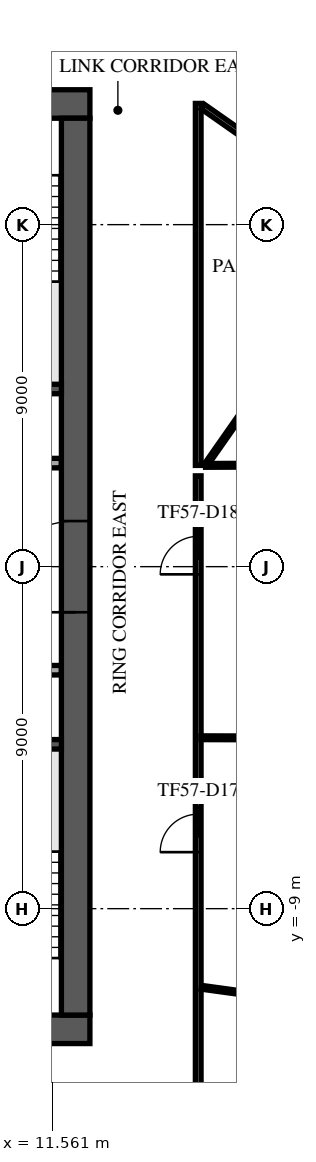
"""IFC4 building model, lengths in metres.
Left out: names, types, materials, properties, quantities, classifications, styles, units other than length and angle.
Written with IfcOpenShell. Run it as: python <this file> out.ifc"""

import sys

from ifc_helpers import new_model, si_unit, direction, frame, frame_2d, origin, place, context, subcontext, project, spatial, rectangle, extrude, element, fill, save


model = new_model("IFC4")
c1 = context("Model", 3, precision=1e-05, world=origin(), true_north=direction((0.0, 1.0)))
c2 = subcontext(c1, "Body", "Model", "MODEL_VIEW")
j1 = project(units=[si_unit("LENGTHUNIT", "METRE"), si_unit("PLANEANGLEUNIT", "RADIAN")], contexts=[c1])
p1 = place(None, origin())
s1 = spatial("IfcSite", under=j1, at=p1, CompositionType="ELEMENT")
p2 = place(p1, origin())
s2 = spatial("IfcBuilding", under=s1, at=p2, CompositionType="ELEMENT")
p3 = place(p2, frame((0.0, 0.0, 242.9)))
s3 = spatial("IfcBuildingStorey", under=s2, at=p3, CompositionType="ELEMENT", Elevation=242.9)
p4 = place(p3, frame((-12.55, 12.175, 0.0), z_axis=(0.0, 0.0, 1.0), x_axis=(1.0, 0.0, 0.0)))
e1 = element("IfcWall", 1, at=p4, inside=s3, PredefinedType="SHEAR", context=c2, shape_type="SweptSolid", body=[
    extrude(rectangle(XDim=25.1, YDim=0.75, at=frame_2d((12.55, 0.0))), origin(), (0.0, 0.0, 1.0), 3.64),
])
p5 = place(p4, frame((11.35, 0.0, 0.0)))
e2 = element("IfcOpeningElement", 2, at=p5, cuts=e1, PredefinedType="OPENING", context=c2, shape_type="SweptSolid", body=[
    extrude(rectangle(XDim=2.4, YDim=2.4, at=frame_2d((1.2, 1.2))), frame((0.0, 0.385, 0.0), z_axis=(0.0, -1.0, 0.0), x_axis=(1.0, 0.0, 0.0)), (0.0, 0.0, 1.0), 0.77),
])
p6 = place(p4, frame((22.175, 0.0, 0.0)))
e3 = element("IfcOpeningElement", 3, at=p6, cuts=e1, PredefinedType="OPENING", context=c2, shape_type="SweptSolid", body=[
    extrude(rectangle(XDim=1.2, YDim=2.1, at=frame_2d((0.6, 1.05))), frame((0.0, 0.385, 0.0), z_axis=(0.0, -1.0, 0.0), x_axis=(1.0, 0.0, 0.0)), (0.0, 0.0, 1.0), 0.77),
])
p7 = place(p4, frame((1.15, 0.0, 0.0)))
e4 = element("IfcOpeningElement", 4, at=p7, cuts=e1, PredefinedType="OPENING", context=c2, shape_type="SweptSolid", body=[
    extrude(rectangle(XDim=1.0, YDim=2.1, at=frame_2d((0.5, 1.05))), frame((0.0, 0.385, 0.0), z_axis=(0.0, -1.0, 0.0), x_axis=(1.0, 0.0, 0.0)), (0.0, 0.0, 1.0), 0.77),
])
p8 = place(p3, frame((-12.55, -12.175, 0.0), z_axis=(0.0, 0.0, 1.0), x_axis=(1.0, 0.0, 0.0)))
e5 = element("IfcWall", 5, at=p8, inside=s3, PredefinedType="SHEAR", context=c2, shape_type="SweptSolid", body=[
    extrude(rectangle(XDim=25.1, YDim=0.75, at=frame_2d((12.55, 0.0))), origin(), (0.0, 0.0, 1.0), 3.64),
])
p9 = place(p8, frame((7.45, 0.0, 0.0)))
e6 = element("IfcOpeningElement", 6, at=p9, cuts=e5, PredefinedType="OPENING", context=c2, shape_type="SweptSolid", body=[
    extrude(rectangle(XDim=2.0, YDim=2.1, at=frame_2d((1.0, 1.05))), frame((0.0, 0.385, 0.0), z_axis=(0.0, -1.0, 0.0), x_axis=(1.0, 0.0, 0.0)), (0.0, 0.0, 1.0), 0.77),
])
p10 = place(p8, frame((17.575, 0.0, 0.0)))
e7 = element("IfcOpeningElement", 7, at=p10, cuts=e5, PredefinedType="OPENING", context=c2, shape_type="SweptSolid", body=[
    extrude(rectangle(XDim=1.2, YDim=2.1, at=frame_2d((0.6, 1.05))), frame((0.0, 0.385, 0.0), z_axis=(0.0, -1.0, 0.0), x_axis=(1.0, 0.0, 0.0)), (0.0, 0.0, 1.0), 0.77),
])
p11 = place(p8, frame((1.725, 0.0, 0.0)))
e8 = element("IfcOpeningElement", 8, at=p11, cuts=e5, PredefinedType="OPENING", context=c2, shape_type="SweptSolid", body=[
    extrude(rectangle(XDim=1.2, YDim=2.1, at=frame_2d((0.6, 1.05))), frame((0.0, 0.385, 0.0), z_axis=(0.0, -1.0, 0.0), x_axis=(1.0, 0.0, 0.0)), (0.0, 0.0, 1.0), 0.77),
])
p12 = place(p8, frame((22.175, 0.0, 0.0)))
e9 = element("IfcOpeningElement", 9, at=p12, cuts=e5, PredefinedType="OPENING", context=c2, shape_type="SweptSolid", body=[
    extrude(rectangle(XDim=1.2, YDim=2.1, at=frame_2d((0.6, 1.05))), frame((0.0, 0.385, 0.0), z_axis=(0.0, -1.0, 0.0), x_axis=(1.0, 0.0, 0.0)), (0.0, 0.0, 1.0), 0.77),
])
p13 = place(p3, frame((12.175, -11.8, 0.0), z_axis=(0.0, 0.0, 1.0), x_axis=(0.0, 1.0, 0.0)))
e10 = element("IfcWall", 10, at=p13, inside=s3, PredefinedType="SHEAR", context=c2, shape_type="SweptSolid", body=[
    extrude(rectangle(XDim=23.6, YDim=0.75, at=frame_2d((11.8, 0.0))), origin(), (0.0, 0.0, 1.0), 3.64),
])
p14 = place(p13, frame((10.6, 0.0, 0.0)))
e11 = element("IfcOpeningElement", 11, at=p14, cuts=e10, PredefinedType="OPENING", context=c2, shape_type="SweptSolid", body=[
    extrude(rectangle(XDim=2.4, YDim=2.4, at=frame_2d((1.2, 1.2))), frame((0.0, 0.385, 0.0), z_axis=(0.0, -1.0, 0.0), x_axis=(1.0, 0.0, 0.0)), (0.0, 0.0, 1.0), 0.77),
])
for number, where, z_axis, x_axis in (
    (12, (8.65, 4.675, 0.0), (0.0, 0.0, 1.0), (1.0, 0.0, 0.0)),
    (13, (8.65, -4.675, 0.0), (0.0, 0.0, 1.0), (1.0, 0.0, 0.0)),
):
    element("IfcWall", number, at=place(p3, frame(where, z_axis=z_axis, x_axis=x_axis)), inside=s3, PredefinedType="SOLIDWALL", context=c2, shape_type="SweptSolid", body=[
        extrude(rectangle(XDim=3.15, YDim=0.25, at=frame_2d((1.575, 0.0))), origin(), (0.0, 0.0, 1.0), 3.64),
    ])
p15 = place(p3, frame((5.63, -2.725, 0.0), z_axis=(0.0, 0.0, 1.0), x_axis=(1.0, 0.0, 0.0)))
e14 = element("IfcWall", 14, at=p15, inside=s3, PredefinedType="PARTITIONING", context=c2, shape_type="SweptSolid", body=[
    extrude(rectangle(XDim=6.165, YDim=0.25, at=frame_2d((3.083, 0.0))), origin(), (0.0, 0.0, 1.0), 3.64),
])
p16 = place(p15, frame((0.745, 0.0, 0.0)))
e15 = element("IfcOpeningElement", 15, at=p16, cuts=e14, PredefinedType="OPENING", context=c2, shape_type="SweptSolid", body=[
    extrude(rectangle(XDim=1.0, YDim=2.1, at=frame_2d((0.5, 1.05))), frame((0.0, 0.135, 0.0), z_axis=(0.0, -1.0, 0.0), x_axis=(1.0, 0.0, 0.0)), (0.0, 0.0, 1.0), 0.27),
])
p17 = place(p15, frame((3.92, 0.0, 0.0)))
e16 = element("IfcOpeningElement", 16, at=p17, cuts=e14, PredefinedType="OPENING", context=c2, shape_type="SweptSolid", body=[
    extrude(rectangle(XDim=0.9, YDim=2.1, at=frame_2d((0.45, 1.05))), frame((0.0, 0.135, 0.0), z_axis=(0.0, -1.0, 0.0), x_axis=(1.0, 0.0, 0.0)), (0.0, 0.0, 1.0), 0.27),
])
p18 = place(p3, frame((-11.795, 2.725, 0.0), z_axis=(0.0, 0.0, 1.0), x_axis=(1.0, 0.0, 0.0)))
e17 = element("IfcWall", 17, at=p18, inside=s3, PredefinedType="PARTITIONING", context=c2, shape_type="SweptSolid", body=[
    extrude(rectangle(XDim=23.59, YDim=0.25, at=frame_2d((11.795, 0.0))), origin(), (0.0, 0.0, 1.0), 3.64),
])
p19 = place(p18, frame((21.345, 0.0, 0.0)))
e18 = element("IfcOpeningElement", 18, at=p19, cuts=e17, PredefinedType="OPENING", context=c2, shape_type="SweptSolid", body=[
    extrude(rectangle(XDim=0.9, YDim=2.1, at=frame_2d((0.45, 1.05))), frame((0.0, 0.135, 0.0), z_axis=(0.0, -1.0, 0.0), x_axis=(1.0, 0.0, 0.0)), (0.0, 0.0, 1.0), 0.27),
])
p20 = place(p18, frame((1.345, 0.0, 0.0)))
e19 = element("IfcOpeningElement", 19, at=p20, cuts=e17, PredefinedType="OPENING", context=c2, shape_type="SweptSolid", body=[
    extrude(rectangle(XDim=0.9, YDim=2.1, at=frame_2d((0.45, 1.05))), frame((0.0, 0.135, 0.0), z_axis=(0.0, -1.0, 0.0), x_axis=(1.0, 0.0, 0.0)), (0.0, 0.0, 1.0), 0.27),
])
p21 = place(p18, frame((4.42, 0.0, 0.0)))
e20 = element("IfcOpeningElement", 20, at=p21, cuts=e17, PredefinedType="OPENING", context=c2, shape_type="SweptSolid", body=[
    extrude(rectangle(XDim=1.0, YDim=2.1, at=frame_2d((0.5, 1.05))), frame((0.0, 0.135, 0.0), z_axis=(0.0, -1.0, 0.0), x_axis=(1.0, 0.0, 0.0)), (0.0, 0.0, 1.0), 0.27),
])
p22 = place(p18, frame((7.17, 0.0, 0.0)))
e21 = element("IfcOpeningElement", 21, at=p22, cuts=e17, PredefinedType="OPENING", context=c2, shape_type="SweptSolid", body=[
    extrude(rectangle(XDim=1.0, YDim=2.1, at=frame_2d((0.5, 1.05))), frame((0.0, 0.135, 0.0), z_axis=(0.0, -1.0, 0.0), x_axis=(1.0, 0.0, 0.0)), (0.0, 0.0, 1.0), 0.27),
])
p23 = place(p18, frame((12.57, 0.0, 0.0)))
e22 = element("IfcOpeningElement", 22, at=p23, cuts=e17, PredefinedType="OPENING", context=c2, shape_type="SweptSolid", body=[
    extrude(rectangle(XDim=1.2, YDim=2.1, at=frame_2d((0.6, 1.05))), frame((0.0, 0.135, 0.0), z_axis=(0.0, -1.0, 0.0), x_axis=(1.0, 0.0, 0.0)), (0.0, 0.0, 1.0), 0.27),
])
p24 = place(p3, frame((5.206, -33.362, 0.0), z_axis=(0.0, 0.0, 1.0), x_axis=(0.573577438409, 0.81915134264, 0.0)))
e23 = element("IfcWall", 23, at=p24, inside=s3, PredefinedType="STANDARD", context=c2, shape_type="SweptSolid", body=[
    extrude(rectangle(XDim=48.686, YDim=0.6, at=frame_2d((24.343, 0.0))), origin(), (0.0, 0.0, 1.0), 3.64),
])
p25 = place(p24, frame((1.213, 0.0, 0.9)))
e24 = element("IfcOpeningElement", 24, at=p25, cuts=e23, PredefinedType="OPENING", context=c2, shape_type="SweptSolid", body=[
    extrude(rectangle(XDim=2.0, YDim=2.1, at=frame_2d((1.0, 1.05))), frame((0.0, 0.31, 0.0), z_axis=(0.0, -1.0, 0.0), x_axis=(1.0, 0.0, 0.0)), (0.0, 0.0, 1.0), 0.62),
])
p26 = place(p24, frame((5.639, 0.0, 0.9)))
e25 = element("IfcOpeningElement", 25, at=p26, cuts=e23, PredefinedType="OPENING", context=c2, shape_type="SweptSolid", body=[
    extrude(rectangle(XDim=2.0, YDim=2.1, at=frame_2d((1.0, 1.05))), frame((0.0, 0.31, 0.0), z_axis=(0.0, -1.0, 0.0), x_axis=(1.0, 0.0, 0.0)), (0.0, 0.0, 1.0), 0.62),
])
p27 = place(p24, frame((10.065, 0.0, 0.9)))
e26 = element("IfcOpeningElement", 26, at=p27, cuts=e23, PredefinedType="OPENING", context=c2, shape_type="SweptSolid", body=[
    extrude(rectangle(XDim=2.0, YDim=2.1, at=frame_2d((1.0, 1.05))), frame((0.0, 0.31, 0.0), z_axis=(0.0, -1.0, 0.0), x_axis=(1.0, 0.0, 0.0)), (0.0, 0.0, 1.0), 0.62),
])
p28 = place(p24, frame((14.491, 0.0, 0.9)))
e27 = element("IfcOpeningElement", 27, at=p28, cuts=e23, PredefinedType="OPENING", context=c2, shape_type="SweptSolid", body=[
    extrude(rectangle(XDim=2.0, YDim=2.1, at=frame_2d((1.0, 1.05))), frame((0.0, 0.31, 0.0), z_axis=(0.0, -1.0, 0.0), x_axis=(1.0, 0.0, 0.0)), (0.0, 0.0, 1.0), 0.62),
])
p29 = place(p24, frame((18.917, 0.0, 0.9)))
e28 = element("IfcOpeningElement", 28, at=p29, cuts=e23, PredefinedType="OPENING", context=c2, shape_type="SweptSolid", body=[
    extrude(rectangle(XDim=2.0, YDim=2.1, at=frame_2d((1.0, 1.05))), frame((0.0, 0.31, 0.0), z_axis=(0.0, -1.0, 0.0), x_axis=(1.0, 0.0, 0.0)), (0.0, 0.0, 1.0), 0.62),
])
p30 = place(p24, frame((23.343, 0.0, 0.9)))
e29 = element("IfcOpeningElement", 29, at=p30, cuts=e23, PredefinedType="OPENING", context=c2, shape_type="SweptSolid", body=[
    extrude(rectangle(XDim=2.0, YDim=2.1, at=frame_2d((1.0, 1.05))), frame((0.0, 0.31, 0.0), z_axis=(0.0, -1.0, 0.0), x_axis=(1.0, 0.0, 0.0)), (0.0, 0.0, 1.0), 0.62),
])
p31 = place(p24, frame((27.769, 0.0, 0.9)))
e30 = element("IfcOpeningElement", 30, at=p31, cuts=e23, PredefinedType="OPENING", context=c2, shape_type="SweptSolid", body=[
    extrude(rectangle(XDim=2.0, YDim=2.1, at=frame_2d((1.0, 1.05))), frame((0.0, 0.31, 0.0), z_axis=(0.0, -1.0, 0.0), x_axis=(1.0, 0.0, 0.0)), (0.0, 0.0, 1.0), 0.62),
])
p32 = place(p24, frame((32.195, 0.0, 0.9)))
e31 = element("IfcOpeningElement", 31, at=p32, cuts=e23, PredefinedType="OPENING", context=c2, shape_type="SweptSolid", body=[
    extrude(rectangle(XDim=2.0, YDim=2.1, at=frame_2d((1.0, 1.05))), frame((0.0, 0.31, 0.0), z_axis=(0.0, -1.0, 0.0), x_axis=(1.0, 0.0, 0.0)), (0.0, 0.0, 1.0), 0.62),
])
p33 = place(p24, frame((36.621, 0.0, 0.9)))
e32 = element("IfcOpeningElement", 32, at=p33, cuts=e23, PredefinedType="OPENING", context=c2, shape_type="SweptSolid", body=[
    extrude(rectangle(XDim=2.0, YDim=2.1, at=frame_2d((1.0, 1.05))), frame((0.0, 0.31, 0.0), z_axis=(0.0, -1.0, 0.0), x_axis=(1.0, 0.0, 0.0)), (0.0, 0.0, 1.0), 0.62),
])
p34 = place(p24, frame((41.047, 0.0, 0.9)))
e33 = element("IfcOpeningElement", 33, at=p34, cuts=e23, PredefinedType="OPENING", context=c2, shape_type="SweptSolid", body=[
    extrude(rectangle(XDim=2.0, YDim=2.1, at=frame_2d((1.0, 1.05))), frame((0.0, 0.31, 0.0), z_axis=(0.0, -1.0, 0.0), x_axis=(1.0, 0.0, 0.0)), (0.0, 0.0, 1.0), 0.62),
])
p35 = place(p24, frame((45.473, 0.0, 0.9)))
e34 = element("IfcOpeningElement", 34, at=p35, cuts=e23, PredefinedType="OPENING", context=c2, shape_type="SweptSolid", body=[
    extrude(rectangle(XDim=2.0, YDim=2.1, at=frame_2d((1.0, 1.05))), frame((0.0, 0.31, 0.0), z_axis=(0.0, -1.0, 0.0), x_axis=(1.0, 0.0, 0.0)), (0.0, 0.0, 1.0), 0.62),
])
p36 = place(p3, frame((-1.89, 27.226, 0.0), z_axis=(0.0, 0.0, 1.0), x_axis=(0.819163235761, -0.573560452941, 0.0)))
e35 = element("IfcWall", 35, at=p36, inside=s3, PredefinedType="PARTITIONING", context=c2, shape_type="SweptSolid", body=[
    extrude(rectangle(XDim=34.403, YDim=0.15, at=frame_2d((17.202, 0.0))), origin(), (0.0, 0.0, 1.0), 3.24),
])
p37 = place(p36, frame((7.427, 0.0, 0.0)))
e36 = element("IfcOpeningElement", 36, at=p37, cuts=e35, PredefinedType="OPENING", context=c2, shape_type="SweptSolid", body=[
    extrude(rectangle(XDim=1.0, YDim=2.1, at=frame_2d((0.5, 1.05))), frame((0.0, 0.085, 0.0), z_axis=(0.0, -1.0, 0.0), x_axis=(1.0, 0.0, 0.0)), (0.0, 0.0, 1.0), 0.17),
])
p38 = place(p36, frame((15.173, 0.0, 0.0)))
e37 = element("IfcOpeningElement", 37, at=p38, cuts=e35, PredefinedType="OPENING", context=c2, shape_type="SweptSolid", body=[
    extrude(rectangle(XDim=1.0, YDim=2.1, at=frame_2d((0.5, 1.05))), frame((0.0, 0.085, 0.0), z_axis=(0.0, -1.0, 0.0), x_axis=(1.0, 0.0, 0.0)), (0.0, 0.0, 1.0), 0.17),
])
p39 = place(p36, frame((19.273, 0.0, 0.0)))
e38 = element("IfcOpeningElement", 38, at=p39, cuts=e35, PredefinedType="OPENING", context=c2, shape_type="SweptSolid", body=[
    extrude(rectangle(XDim=1.0, YDim=2.1, at=frame_2d((0.5, 1.05))), frame((0.0, 0.085, 0.0), z_axis=(0.0, -1.0, 0.0), x_axis=(1.0, 0.0, 0.0)), (0.0, 0.0, 1.0), 0.17),
])
p40 = place(p3, frame((15.4, -15.325, 0.0), z_axis=(0.0, 0.0, 1.0), x_axis=(0.0, 1.0, 0.0)))
e39 = element("IfcWall", 39, at=p40, inside=s3, PredefinedType="PARTITIONING", context=c2, shape_type="SweptSolid", body=[
    extrude(rectangle(XDim=17.715, YDim=0.15, at=frame_2d((8.857, 0.0))), origin(), (0.0, 0.0, 1.0), 3.24),
])
p41 = place(p40, frame((7.812, 0.0, 0.0)))
e40 = element("IfcOpeningElement", 40, at=p41, cuts=e39, PredefinedType="OPENING", context=c2, shape_type="SweptSolid", body=[
    extrude(rectangle(XDim=1.0, YDim=2.1, at=frame_2d((0.5, 1.05))), frame((0.0, 0.085, 0.0), z_axis=(0.0, -1.0, 0.0), x_axis=(1.0, 0.0, 0.0)), (0.0, 0.0, 1.0), 0.17),
])
p42 = place(p40, frame((15.123, 0.0, 0.0)))
e41 = element("IfcOpeningElement", 41, at=p42, cuts=e39, PredefinedType="OPENING", context=c2, shape_type="SweptSolid", body=[
    extrude(rectangle(XDim=1.0, YDim=2.1, at=frame_2d((0.5, 1.05))), frame((0.0, 0.085, 0.0), z_axis=(0.0, -1.0, 0.0), x_axis=(1.0, 0.0, 0.0)), (0.0, 0.0, 1.0), 0.17),
])
p43 = place(p3, frame((15.4, 2.664, 0.0), z_axis=(0.0, 0.0, 1.0), x_axis=(0.0, 1.0, 0.0)))
e42 = element("IfcWall", 42, at=p43, inside=s3, PredefinedType="PARTITIONING", context=c2, shape_type="SweptSolid", body=[
    extrude(rectangle(XDim=9.526, YDim=0.15, at=frame_2d((4.763, 0.0))), origin(), (0.0, 0.0, 1.0), 3.24),
])
p44 = place(p3, frame((15.518, 12.107, 0.0), z_axis=(0.0, 0.0, 1.0), x_axis=(0.819171924474, -0.573548043457, 0.0)))
e43 = element("IfcWall", 43, at=p44, inside=s3, PredefinedType="PARTITIONING", context=c2, shape_type="SweptSolid", body=[
    extrude(rectangle(XDim=11.471, YDim=0.15, at=frame_2d((5.736, 0.0))), origin(), (0.0, 0.0, 1.0), 3.24),
])
p45 = place(p44, frame((2.05, 0.0, 0.0)))
e44 = element("IfcOpeningElement", 44, at=p45, cuts=e43, PredefinedType="OPENING", context=c2, shape_type="SweptSolid", body=[
    extrude(rectangle(XDim=1.0, YDim=2.1, at=frame_2d((0.5, 1.05))), frame((0.0, 0.085, 0.0), z_axis=(0.0, -1.0, 0.0), x_axis=(1.0, 0.0, 0.0)), (0.0, 0.0, 1.0), 0.17),
])
p46 = place(p44, frame((10.027, 0.0, 0.0)))
e45 = element("IfcOpeningElement", 45, at=p46, cuts=e43, PredefinedType="OPENING", context=c2, shape_type="SweptSolid", body=[
    extrude(rectangle(XDim=1.0, YDim=2.1, at=frame_2d((0.5, 1.05))), frame((0.0, 0.085, 0.0), z_axis=(0.0, -1.0, 0.0), x_axis=(1.0, 0.0, 0.0)), (0.0, 0.0, 1.0), 0.17),
])
p47 = place(p3, frame((15.482, -11.068, 0.0), z_axis=(0.0, 0.0, 1.0), x_axis=(0.990680100766, -0.136209169832, 0.0)))
e46 = element("IfcWall", 46, at=p47, inside=s3, PredefinedType="PARTITIONING", context=c2, shape_type="SweptSolid", body=[
    extrude(rectangle(XDim=4.573, YDim=0.1, at=frame_2d((2.286, 0.0))), origin(), (0.0, 0.0, 1.0), 3.12),
])
p48 = place(p3, frame((15.475, -4.502, 0.0), z_axis=(0.0, 0.0, 1.0), x_axis=(0.999996329774, -0.00270932448, 0.0)))
e47 = element("IfcWall", 47, at=p48, inside=s3, PredefinedType="PARTITIONING", context=c2, shape_type="SweptSolid", body=[
    extrude(rectangle(XDim=9.552, YDim=0.1, at=frame_2d((4.776, 0.0))), origin(), (0.0, 0.0, 1.0), 3.24),
])
p49 = place(p3, frame((15.593, 2.665, 0.0), z_axis=(0.0, 0.0, 1.0), x_axis=(0.999993270933, 0.003668526741, 0.0)))
e48 = element("IfcWall", 48, at=p49, inside=s3, PredefinedType="PARTITIONING", context=c2, shape_type="SweptSolid", body=[
    extrude(rectangle(XDim=14.508, YDim=0.1, at=frame_2d((7.254, 0.0))), origin(), (0.0, 0.0, 1.0), 3.64),
])
p50 = place(p3, frame((15.648, 2.744, 0.0), z_axis=(0.0, 0.0, 1.0), x_axis=(0.57357562998, 0.819152608915, 0.0)))
e49 = element("IfcWall", 49, at=p50, inside=s3, PredefinedType="PARTITIONING", context=c2, shape_type="SweptSolid", body=[
    extrude(rectangle(XDim=7.521, YDim=0.1, at=frame_2d((3.76, 0.0))), origin(), (0.0, 0.0, 1.0), 3.24),
])
p51 = place(p14, origin())
e50 = element("IfcDoor", 50, at=p51, inside=s3, OperationType="SINGLE_SWING_LEFT", PredefinedType="DOOR", context=c2, shape_type="SweptSolid", body=[
    extrude(rectangle(XDim=2.4, YDim=2.4, at=frame_2d((1.2, 1.2))), frame((0.0, 0.025, 0.0), z_axis=(0.0, -1.0, 0.0), x_axis=(1.0, 0.0, 0.0)), (0.0, 0.0, 1.0), 0.05),
])
fill(e11, e50)
p52 = place(p41, frame((1.0, 0.0, 0.0), z_axis=(0.0, 0.0, 1.0), x_axis=(-1.0, 0.0, 0.0)))
e51 = element("IfcDoor", 51, at=p52, inside=s3, OperationType="SINGLE_SWING_RIGHT", PredefinedType="DOOR", context=c2, shape_type="SweptSolid", body=[
    extrude(rectangle(XDim=1.0, YDim=2.1, at=frame_2d((0.5, 1.05))), frame((0.0, 0.025, 0.0), z_axis=(0.0, -1.0, 0.0), x_axis=(1.0, 0.0, 0.0)), (0.0, 0.0, 1.0), 0.05),
])
fill(e40, e51)
p53 = place(p42, frame((1.0, 0.0, 0.0), z_axis=(0.0, 0.0, 1.0), x_axis=(-1.0, 0.0, 0.0)))
e52 = element("IfcDoor", 52, at=p53, inside=s3, OperationType="SINGLE_SWING_RIGHT", PredefinedType="DOOR", context=c2, shape_type="SweptSolid", body=[
    extrude(rectangle(XDim=1.0, YDim=2.1, at=frame_2d((0.5, 1.05))), frame((0.0, 0.025, 0.0), z_axis=(0.0, -1.0, 0.0), x_axis=(1.0, 0.0, 0.0)), (0.0, 0.0, 1.0), 0.05),
])
fill(e41, e52)
save(model, sys.argv[1])
